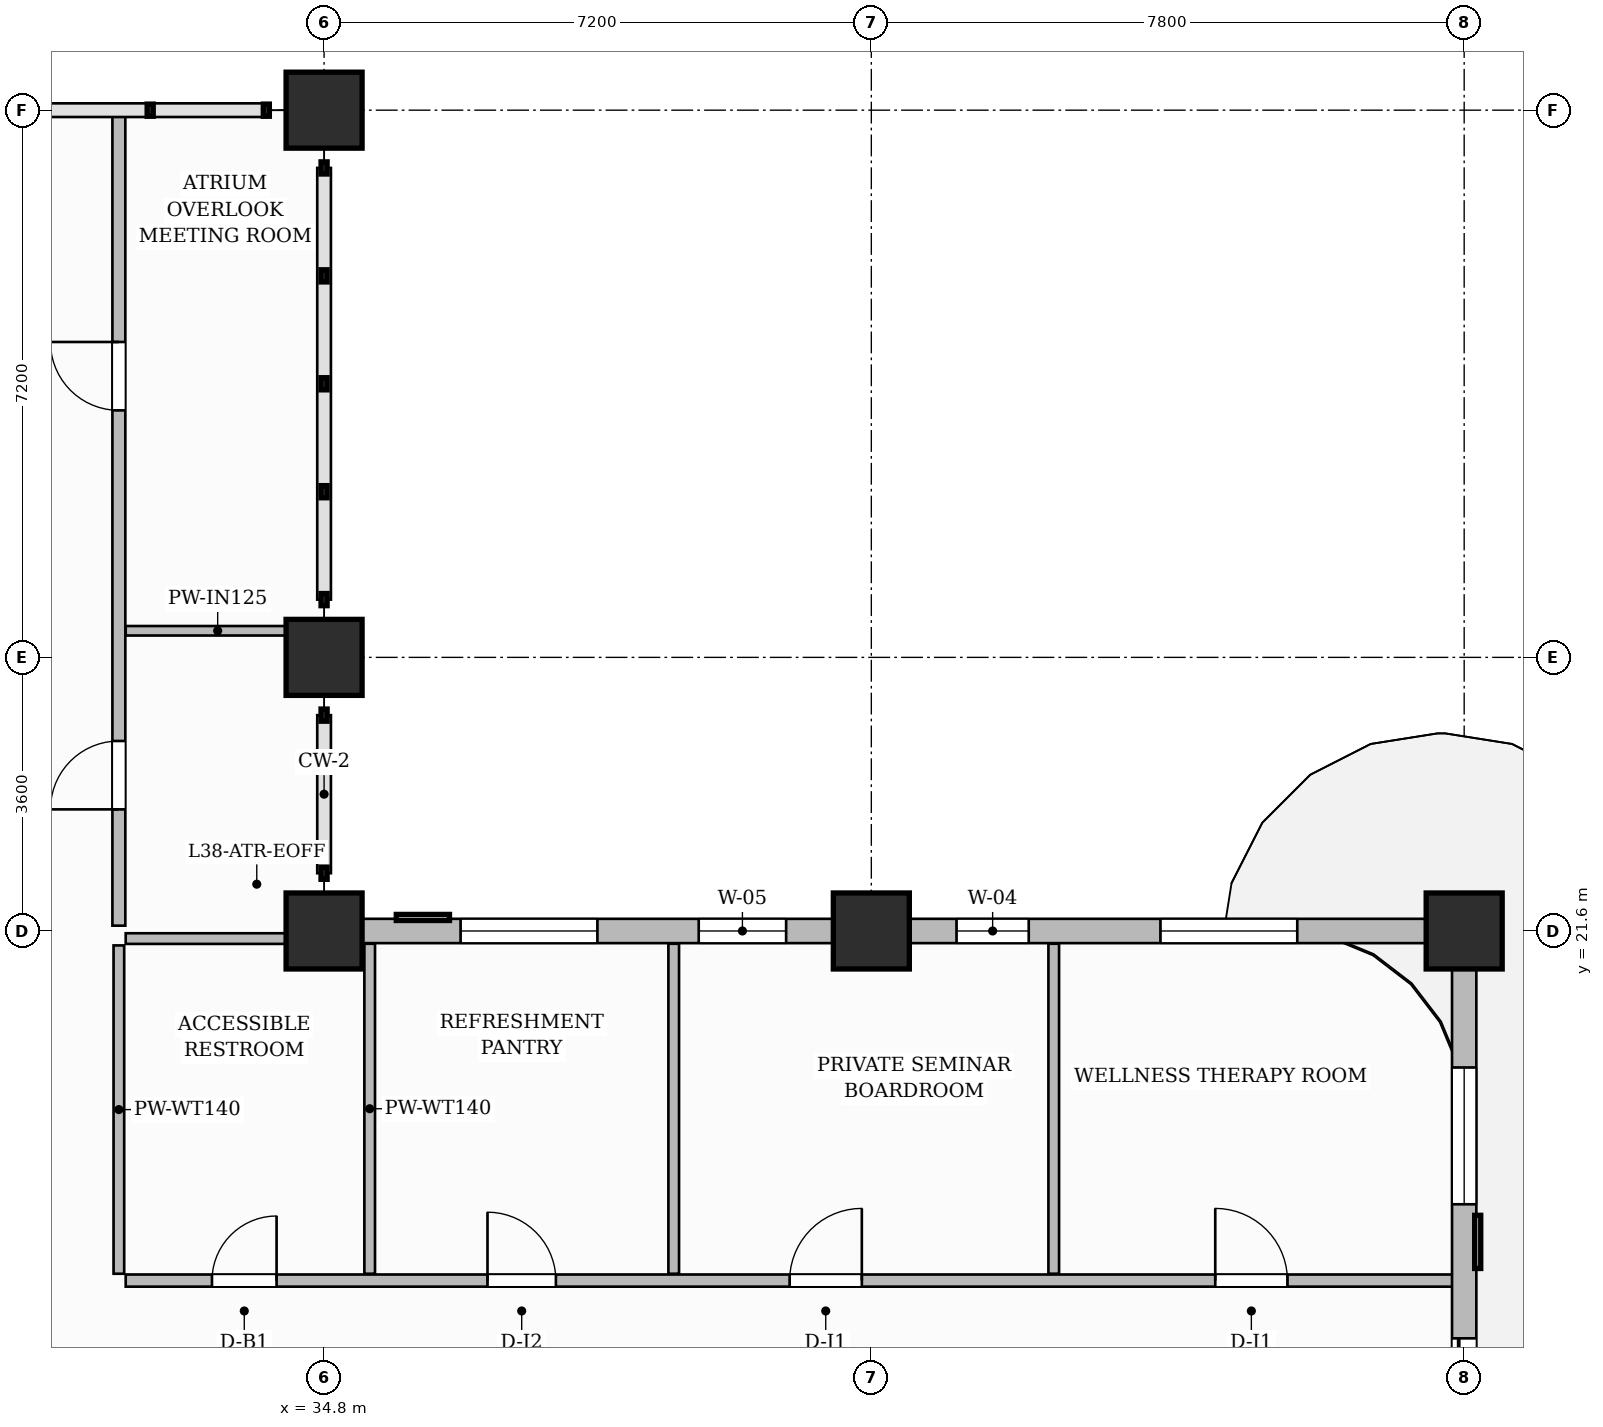
"""IFC4 building model, lengths in metres.
Left out: names, types, materials, properties, quantities, classifications, styles, units other than length and angle.
Written with IfcOpenShell. Run it as: python <this file> out.ifc"""

import sys

from ifc_helpers import new_model, si_unit, direction, frame, frame_2d, origin, origin_2d, place, context, subcontext, project, spatial, rectangle, extrude, source, transform, mapped, element, fill, save


model = new_model("IFC4")
c1 = context("Model", 3, precision=1e-05, world=origin(), true_north=direction((0.0, 1.0)))
c2 = subcontext(c1, "Body", "Model", "MODEL_VIEW")
j1 = project(units=[si_unit("LENGTHUNIT", "METRE"), si_unit("PLANEANGLEUNIT", "RADIAN")], contexts=[c1])
p1 = place(None, origin())
s1 = spatial("IfcSite", under=j1, at=p1, CompositionType="ELEMENT")
p2 = place(p1, origin())
s2 = spatial("IfcBuilding", under=s1, at=p2, CompositionType="ELEMENT")
p3 = place(p2, frame((0.0, 0.0, 154.15)))
s3 = spatial("IfcBuildingStorey", under=s2, at=p3, CompositionType="ELEMENT", Elevation=154.15)
m1 = source(origin(), c2, "Body", "SweptSolid", [
    extrude(rectangle(XDim=1.0, YDim=1.0, at=origin_2d()), origin(), (0.0, 0.0, 1.0), 3.85),
])
for number, where, z_axis, x_axis in (
    (1, (34.8, 21.6, 0.0), (0.0, 0.0, 1.0), (1.0, 0.0, 0.0)),
    (2, (34.8, 25.2, 0.0), (0.0, 0.0, 1.0), (1.0, 0.0, 0.0)),
    (3, (34.8, 32.4, 0.0), (0.0, 0.0, 1.0), (1.0, 0.0, 0.0)),
    (4, (42.0, 21.6, 0.0), (0.0, 0.0, 1.0), (1.0, 0.0, 0.0)),
    (5, (49.8, 21.6, 0.0), (0.0, 0.0, 1.0), (1.0, 0.0, 0.0)),
):
    element("IfcColumn", number, at=place(p3, frame(where, z_axis=z_axis, x_axis=x_axis)), inside=s3, PredefinedType="COLUMN", context=c2, shape_type="MappedRepresentation", body=[
        mapped(m1, transform((0.0, 0.0, 0.0), scale=1.0)),
    ])
p4 = place(p3, frame((32.19, 17.0, 0.0), z_axis=(0.0, 0.0, 1.0), x_axis=(1.0, 0.0, 0.0)))
e6 = element("IfcWall", 6, at=p4, inside=s3, PredefinedType="PARTITIONING", context=c2, shape_type="SweptSolid", body=[
    extrude(rectangle(XDim=17.47, YDim=0.16, at=frame_2d((8.735, 0.0))), origin(), (0.0, 0.0, 1.0), 3.6),
])
p5 = place(p4, frame((1.135, 0.0, 0.0)))
e7 = element("IfcOpeningElement", 7, at=p5, cuts=e6, PredefinedType="OPENING", context=c2, shape_type="SweptSolid", body=[
    extrude(rectangle(XDim=0.85, YDim=2.1, at=frame_2d((0.425, 1.05))), frame((0.0, 0.09, 0.0), z_axis=(0.0, -1.0, 0.0), x_axis=(1.0, 0.0, 0.0)), (0.0, 0.0, 1.0), 0.18),
])
p6 = place(p4, frame((4.76, 0.0, 0.0)))
e8 = element("IfcOpeningElement", 8, at=p6, cuts=e6, PredefinedType="OPENING", context=c2, shape_type="SweptSolid", body=[
    extrude(rectangle(XDim=0.9, YDim=2.15, at=frame_2d((0.45, 1.075))), frame((0.0, 0.09, 0.0), z_axis=(0.0, -1.0, 0.0), x_axis=(1.0, 0.0, 0.0)), (0.0, 0.0, 1.0), 0.18),
])
p7 = place(p4, frame((8.735, 0.0, 0.0)))
e9 = element("IfcOpeningElement", 9, at=p7, cuts=e6, PredefinedType="OPENING", context=c2, shape_type="SweptSolid", body=[
    extrude(rectangle(XDim=0.95, YDim=2.15, at=frame_2d((0.475, 1.075))), frame((0.0, 0.09, 0.0), z_axis=(0.0, -1.0, 0.0), x_axis=(1.0, 0.0, 0.0)), (0.0, 0.0, 1.0), 0.18),
])
p8 = place(p4, frame((14.335, 0.0, 0.0)))
e10 = element("IfcOpeningElement", 10, at=p8, cuts=e6, PredefinedType="OPENING", context=c2, shape_type="SweptSolid", body=[
    extrude(rectangle(XDim=0.95, YDim=2.15, at=frame_2d((0.475, 1.075))), frame((0.0, 0.09, 0.0), z_axis=(0.0, -1.0, 0.0), x_axis=(1.0, 0.0, 0.0)), (0.0, 0.0, 1.0), 0.18),
])
p9 = place(p3, frame((32.1, 17.09, 0.0), z_axis=(0.0, 0.0, 1.0), x_axis=(0.0, 1.0, 0.0)))
e11 = element("IfcWall", 11, at=p9, inside=s3, PredefinedType="PARTITIONING", context=c2, shape_type="SweptSolid", body=[
    extrude(rectangle(XDim=4.32, YDim=0.14, at=frame_2d((2.16, 0.0))), origin(), (0.0, 0.0, 1.0), 3.6),
])
for number, where, z_axis, x_axis in (
    (12, (35.4, 17.09, 0.0), (0.0, 0.0, 1.0), (0.0, 1.0, 0.0)),
    (13, (39.4, 17.09, 0.0), (0.0, 0.0, 1.0), (0.0, 1.0, 0.0)),
    (14, (44.4, 17.09, 0.0), (0.0, 0.0, 1.0), (0.0, 1.0, 0.0)),
):
    element("IfcWall", number, at=place(p3, frame(where, z_axis=z_axis, x_axis=x_axis)), inside=s3, PredefinedType="PARTITIONING", context=c2, shape_type="SweptSolid", body=[
        extrude(rectangle(XDim=4.342, YDim=0.14, at=frame_2d((2.171, 0.0))), origin(), (0.0, 0.0, 1.0), 3.6),
    ])
p10 = place(p3, frame((32.19, 21.5, 0.0), z_axis=(0.0, 0.0, 1.0), x_axis=(1.0, 0.0, 0.0)))
e15 = element("IfcWall", 15, at=p10, inside=s3, PredefinedType="PARTITIONING", context=c2, shape_type="SweptSolid", body=[
    extrude(rectangle(XDim=2.42, YDim=0.14, at=frame_2d((1.21, 0.0))), origin(), (0.0, 0.0, 1.0), 3.085),
])
p11 = place(p3, frame((32.1, 21.67, 0.0), z_axis=(0.0, 0.0, 1.0), x_axis=(0.0, 1.0, 0.0)))
e16 = element("IfcWall", 16, at=p11, inside=s3, PredefinedType="PARTITIONING", context=c2, shape_type="SweptSolid", body=[
    extrude(rectangle(XDim=10.702, YDim=0.17, at=frame_2d((5.351, 0.0))), origin(), (0.0, 0.0, 1.0), 3.6),
])
p12 = place(p11, frame((1.53, 0.0, 0.0)))
e17 = element("IfcOpeningElement", 17, at=p12, cuts=e16, PredefinedType="OPENING", context=c2, shape_type="SweptSolid", body=[
    extrude(rectangle(XDim=0.9, YDim=2.15, at=frame_2d((0.45, 1.075))), frame((0.0, 0.095, 0.0), z_axis=(0.0, -1.0, 0.0), x_axis=(1.0, 0.0, 0.0)), (0.0, 0.0, 1.0), 0.19),
])
p13 = place(p11, frame((6.78, 0.0, 0.0)))
e18 = element("IfcOpeningElement", 18, at=p13, cuts=e16, PredefinedType="OPENING", context=c2, shape_type="SweptSolid", body=[
    extrude(rectangle(XDim=0.9, YDim=2.15, at=frame_2d((0.45, 1.075))), frame((0.0, 0.095, 0.0), z_axis=(0.0, -1.0, 0.0), x_axis=(1.0, 0.0, 0.0)), (0.0, 0.0, 1.0), 0.19),
])
p14 = place(p3, frame((32.19, 25.55, 0.0), z_axis=(0.0, 0.0, 1.0), x_axis=(1.0, 0.0, 0.0)))
e19 = element("IfcWall", 19, at=p14, inside=s3, PredefinedType="PARTITIONING", context=c2, shape_type="SweptSolid", body=[
    extrude(rectangle(XDim=2.42, YDim=0.125, at=frame_2d((1.21, 0.0))), origin(), (0.0, 0.0, 1.0), 3.6),
])
p15 = place(p3, frame((49.8, 14.62, 0.0), z_axis=(0.0, 0.0, 1.0), x_axis=(0.0, 1.0, 0.0)))
e20 = element("IfcWall", 20, at=p15, inside=s3, PredefinedType="SOLIDWALL", context=c2, shape_type="SweptSolid", body=[
    extrude(rectangle(XDim=6.93, YDim=0.32, at=frame_2d((3.465, 0.0))), origin(), (0.0, 0.0, 1.0), 3.085),
])
p16 = place(p15, frame((0.42, 0.0, 0.0)))
e21 = element("IfcOpeningElement", 21, at=p16, cuts=e20, PredefinedType="OPENING", context=c2, shape_type="SweptSolid", body=[
    extrude(rectangle(XDim=1.2, YDim=2.2, at=frame_2d((0.6, 1.1))), frame((0.0, 0.17, 0.0), z_axis=(0.0, -1.0, 0.0), x_axis=(1.0, 0.0, 0.0)), (0.0, 0.0, 1.0), 0.34),
])
p17 = place(p15, frame((3.384, 0.0, 0.8)))
e22 = element("IfcOpeningElement", 22, at=p17, cuts=e20, PredefinedType="OPENING", context=c2, shape_type="SweptSolid", body=[
    extrude(rectangle(XDim=1.8, YDim=1.85, at=frame_2d((0.9, 0.925))), frame((0.0, 0.17, 0.0), z_axis=(0.0, -1.0, 0.0), x_axis=(1.0, 0.0, 0.0)), (0.0, 0.0, 1.0), 0.34),
])
p18 = place(p3, frame((34.8, 21.6, 0.0), z_axis=(0.0, 0.0, 1.0), x_axis=(1.0, 0.0, 0.0)))
e23 = element("IfcWall", 23, at=p18, inside=s3, PredefinedType="SOLIDWALL", context=c2, shape_type="SweptSolid", body=[
    extrude(rectangle(XDim=15.0, YDim=0.32, at=frame_2d((7.5, 0.0))), origin(), (0.0, 0.0, 1.0), 3.085),
])
p19 = place(p18, frame((1.796, 0.0, 0.8)))
e24 = element("IfcOpeningElement", 24, at=p19, cuts=e23, PredefinedType="OPENING", context=c2, shape_type="SweptSolid", body=[
    extrude(rectangle(XDim=1.8, YDim=1.85, at=frame_2d((0.9, 0.925))), frame((0.0, 0.17, 0.0), z_axis=(0.0, -1.0, 0.0), x_axis=(1.0, 0.0, 0.0)), (0.0, 0.0, 1.0), 0.34),
])
p20 = place(p18, frame((4.929, 0.0, 0.8)))
e25 = element("IfcOpeningElement", 25, at=p20, cuts=e23, PredefinedType="OPENING", context=c2, shape_type="SweptSolid", body=[
    extrude(rectangle(XDim=1.15, YDim=1.8, at=frame_2d((0.575, 0.9))), frame((0.0, 0.17, 0.0), z_axis=(0.0, -1.0, 0.0), x_axis=(1.0, 0.0, 0.0)), (0.0, 0.0, 1.0), 0.34),
])
p21 = place(p18, frame((8.321, 0.0, 0.8)))
e26 = element("IfcOpeningElement", 26, at=p21, cuts=e23, PredefinedType="OPENING", context=c2, shape_type="SweptSolid", body=[
    extrude(rectangle(XDim=0.95, YDim=1.75, at=frame_2d((0.475, 0.875))), frame((0.0, 0.17, 0.0), z_axis=(0.0, -1.0, 0.0), x_axis=(1.0, 0.0, 0.0)), (0.0, 0.0, 1.0), 0.34),
])
p22 = place(p18, frame((11.004, 0.0, 0.8)))
e27 = element("IfcOpeningElement", 27, at=p22, cuts=e23, PredefinedType="OPENING", context=c2, shape_type="SweptSolid", body=[
    extrude(rectangle(XDim=1.8, YDim=1.85, at=frame_2d((0.9, 0.925))), frame((0.0, 0.17, 0.0), z_axis=(0.0, -1.0, 0.0), x_axis=(1.0, 0.0, 0.0)), (0.0, 0.0, 1.0), 0.34),
])
m2 = source(origin(), c2, "Body", "SweptSolid", [
    extrude(rectangle(XDim=0.85, YDim=2.1, at=frame_2d((0.425, 1.05))), frame((0.0, 0.025, 0.0), z_axis=(0.0, -1.0, 0.0), x_axis=(1.0, 0.0, 0.0)), (0.0, 0.0, 1.0), 0.05),
])
p23 = place(p5, origin())
e28 = element("IfcDoor", 28, at=p23, inside=s3, OperationType="SINGLE_SWING_RIGHT", PredefinedType="DOOR", context=c2, shape_type="MappedRepresentation", body=[
    mapped(m2, transform((0.0, 0.0, 0.0), scale=1.0)),
])
fill(e7, e28)
m3 = source(origin(), c2, "Body", "SweptSolid", [
    extrude(rectangle(XDim=0.9, YDim=2.15, at=frame_2d((0.45, 1.075))), frame((0.0, 0.025, 0.0), z_axis=(0.0, -1.0, 0.0), x_axis=(1.0, 0.0, 0.0)), (0.0, 0.0, 1.0), 0.05),
])
p24 = place(p6, origin())
e29 = element("IfcDoor", 29, at=p24, inside=s3, OperationType="SINGLE_SWING_LEFT", PredefinedType="DOOR", context=c2, shape_type="MappedRepresentation", body=[
    mapped(m3, transform((0.0, 0.0, 0.0), scale=1.0)),
])
fill(e8, e29)
m4 = source(origin(), c2, "Body", "SweptSolid", [
    extrude(rectangle(XDim=0.95, YDim=2.15, at=frame_2d((0.475, 1.075))), frame((0.0, 0.025, 0.0), z_axis=(0.0, -1.0, 0.0), x_axis=(1.0, 0.0, 0.0)), (0.0, 0.0, 1.0), 0.05),
])
p25 = place(p7, origin())
e30 = element("IfcDoor", 30, at=p25, inside=s3, OperationType="SINGLE_SWING_RIGHT", PredefinedType="DOOR", context=c2, shape_type="MappedRepresentation", body=[
    mapped(m4, transform((0.0, 0.0, 0.0), scale=1.0)),
])
fill(e9, e30)
p26 = place(p8, origin())
e31 = element("IfcDoor", 31, at=p26, inside=s3, OperationType="SINGLE_SWING_LEFT", PredefinedType="DOOR", context=c2, shape_type="MappedRepresentation", body=[
    mapped(m4, transform((0.0, 0.0, 0.0), scale=1.0)),
])
fill(e10, e31)
p27 = place(p12, origin())
e32 = element("IfcDoor", 32, at=p27, inside=s3, OperationType="SINGLE_SWING_LEFT", PredefinedType="DOOR", context=c2, shape_type="MappedRepresentation", body=[
    mapped(m3, transform((0.0, 0.0, 0.0), scale=1.0)),
])
fill(e17, e32)
p28 = place(p13, origin())
e33 = element("IfcDoor", 33, at=p28, inside=s3, OperationType="SINGLE_SWING_RIGHT", PredefinedType="DOOR", context=c2, shape_type="MappedRepresentation", body=[
    mapped(m3, transform((0.0, 0.0, 0.0), scale=1.0)),
])
fill(e18, e33)
m5 = source(origin(), c2, "Body", "SweptSolid", [
    extrude(rectangle(XDim=1.2, YDim=2.2, at=frame_2d((0.6, 1.1))), frame((0.0, 0.025, 0.0), z_axis=(0.0, -1.0, 0.0), x_axis=(1.0, 0.0, 0.0)), (0.0, 0.0, 1.0), 0.05),
])
p29 = place(p16, origin())
e34 = element("IfcDoor", 34, at=p29, inside=s3, OperationType="SLIDING_TO_LEFT", PredefinedType="DOOR", context=c2, shape_type="MappedRepresentation", body=[
    mapped(m5, transform((0.0, 0.0, 0.0), scale=1.0)),
])
fill(e21, e34)
m6 = source(origin(), c2, "Body", "SweptSolid", [
    extrude(rectangle(XDim=1.8, YDim=1.85, at=frame_2d((0.9, 0.925))), frame((0.0, 0.03, 0.0), z_axis=(0.0, -1.0, 0.0), x_axis=(1.0, 0.0, 0.0)), (0.0, 0.0, 1.0), 0.06),
])
p30 = place(p17, origin())
e35 = element("IfcWindow", 35, at=p30, inside=s3, PartitioningType="DOUBLE_PANEL_VERTICAL", PredefinedType="WINDOW", context=c2, shape_type="MappedRepresentation", body=[
    mapped(m6, transform((0.0, 0.0, 0.0), scale=1.0)),
])
fill(e22, e35)
p31 = place(p19, origin())
e36 = element("IfcWindow", 36, at=p31, inside=s3, PartitioningType="DOUBLE_PANEL_VERTICAL", PredefinedType="WINDOW", context=c2, shape_type="MappedRepresentation", body=[
    mapped(m6, transform((0.0, 0.0, 0.0), scale=1.0)),
])
fill(e24, e36)
m7 = source(origin(), c2, "Body", "SweptSolid", [
    extrude(rectangle(XDim=1.15, YDim=1.8, at=frame_2d((0.575, 0.9))), frame((0.0, 0.03, 0.0), z_axis=(0.0, -1.0, 0.0), x_axis=(1.0, 0.0, 0.0)), (0.0, 0.0, 1.0), 0.06),
])
p32 = place(p20, origin())
e37 = element("IfcWindow", 37, at=p32, inside=s3, PartitioningType="SINGLE_PANEL", PredefinedType="WINDOW", context=c2, shape_type="MappedRepresentation", body=[
    mapped(m7, transform((0.0, 0.0, 0.0), scale=1.0)),
])
fill(e25, e37)
m8 = source(origin(), c2, "Body", "SweptSolid", [
    extrude(rectangle(XDim=0.95, YDim=1.75, at=frame_2d((0.475, 0.875))), frame((0.0, 0.03, 0.0), z_axis=(0.0, -1.0, 0.0), x_axis=(1.0, 0.0, 0.0)), (0.0, 0.0, 1.0), 0.06),
])
p33 = place(p21, origin())
e38 = element("IfcWindow", 38, at=p33, inside=s3, PartitioningType="SINGLE_PANEL", PredefinedType="WINDOW", context=c2, shape_type="MappedRepresentation", body=[
    mapped(m8, transform((0.0, 0.0, 0.0), scale=1.0)),
])
fill(e26, e38)
p34 = place(p22, origin())
e39 = element("IfcWindow", 39, at=p34, inside=s3, PartitioningType="DOUBLE_PANEL_VERTICAL", PredefinedType="WINDOW", context=c2, shape_type="MappedRepresentation", body=[
    mapped(m6, transform((0.0, 0.0, 0.0), scale=1.0)),
])
fill(e27, e39)
save(model, sys.argv[1])
